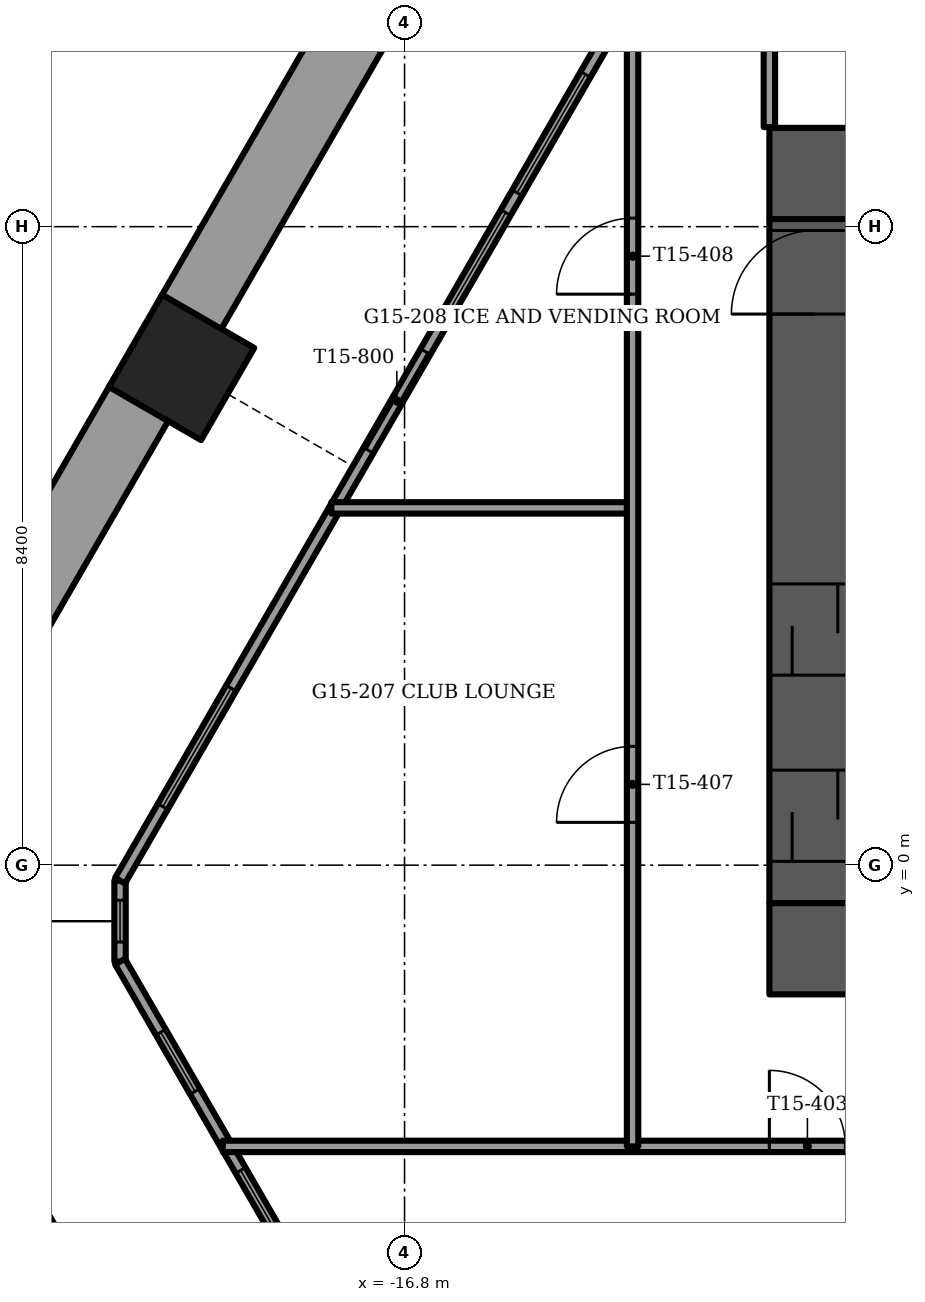
"""IFC4 building model, lengths in metres.
Left out: names, types, materials, properties, quantities, classifications, styles, units other than length and angle.
Written with IfcOpenShell. Run it as: python <this file> out.ifc"""

import sys

from ifc_helpers import new_model, si_unit, direction, frame, frame_2d, origin, origin_2d, place, context, subcontext, project, spatial, rectangle, extrude, element, fill, save


model = new_model("IFC4")
c1 = context("Model", 3, precision=1e-05, world=origin(), true_north=direction((0.0, 1.0)))
c2 = subcontext(c1, "Body", "Model", "MODEL_VIEW")
j1 = project(units=[si_unit("LENGTHUNIT", "METRE"), si_unit("PLANEANGLEUNIT", "RADIAN")], contexts=[c1])
p1 = place(None, origin())
s1 = spatial("IfcSite", under=j1, at=p1, CompositionType="ELEMENT")
p2 = place(p1, origin())
s2 = spatial("IfcBuilding", under=s1, at=p2, CompositionType="ELEMENT")
p3 = place(p2, frame((0.0, 0.0, 61.75)))
s3 = spatial("IfcBuildingStorey", under=s2, at=p3, CompositionType="ELEMENT", Elevation=61.75)
p4 = place(p3, frame((-19.733, 6.549, -1.2), z_axis=(0.0, 0.0, 1.0), x_axis=(0.5, 0.866025403784, 0.0)))
e1 = element("IfcColumn", 1, at=p4, inside=s3, PredefinedType="COLUMN", context=c2, shape_type="SweptSolid", body=[
    extrude(rectangle(XDim=1.4, YDim=1.4, at=origin_2d()), origin(), (0.0, 0.0, 1.0), 3.75),
])
p5 = place(p3, frame((-12.0, -1.1, -0.3), z_axis=(0.0, 0.0, 1.0), x_axis=(1.0, 0.0, 0.0)))
e2 = element("IfcWall", 2, at=p5, inside=s3, PredefinedType="SHEAR", context=c2, shape_type="SweptSolid", body=[
    extrude(rectangle(XDim=24.0, YDim=1.2, at=frame_2d((12.0, 0.0))), origin(), (0.0, 0.0, 1.0), 3.75),
])
p6 = place(p5, frame((11.2, 0.0, 0.0)))
e3 = element("IfcOpeningElement", 3, at=p6, cuts=e2, PredefinedType="OPENING", context=c2, shape_type="SweptSolid", body=[
    extrude(rectangle(XDim=1.6, YDim=2.1, at=frame_2d((0.8, 1.05))), frame((0.0, 0.6, 0.0), z_axis=(0.0, -1.0, 0.0), x_axis=(1.0, 0.0, 0.0)), (0.0, 0.0, 1.0), 1.2),
])
p7 = place(p3, frame((-12.0, 9.1, -0.3), z_axis=(0.0, 0.0, 1.0), x_axis=(1.0, 0.0, 0.0)))
e4 = element("IfcWall", 4, at=p7, inside=s3, PredefinedType="SHEAR", context=c2, shape_type="SweptSolid", body=[
    extrude(rectangle(XDim=24.0, YDim=1.2, at=frame_2d((12.0, 0.0))), origin(), (0.0, 0.0, 1.0), 3.75),
])
p8 = place(p7, frame((11.2, 0.0, 0.0)))
e5 = element("IfcOpeningElement", 5, at=p8, cuts=e4, PredefinedType="OPENING", context=c2, shape_type="SweptSolid", body=[
    extrude(rectangle(XDim=1.6, YDim=2.1, at=frame_2d((0.8, 1.05))), frame((0.0, 0.6, 0.0), z_axis=(0.0, -1.0, 0.0), x_axis=(1.0, 0.0, 0.0)), (0.0, 0.0, 1.0), 1.2),
])
p9 = place(p7, frame((5.25, 0.0, 0.0)))
e6 = element("IfcOpeningElement", 6, at=p9, cuts=e4, PredefinedType="OPENING", context=c2, shape_type="SweptSolid", body=[
    extrude(rectangle(XDim=1.1, YDim=2.1, at=frame_2d((0.55, 1.05))), frame((0.0, 0.6, 0.0), z_axis=(0.0, -1.0, 0.0), x_axis=(1.0, 0.0, 0.0)), (0.0, 0.0, 1.0), 1.2),
])
p10 = place(p7, frame((17.65, 0.0, 0.0)))
e7 = element("IfcOpeningElement", 7, at=p10, cuts=e4, PredefinedType="OPENING", context=c2, shape_type="SweptSolid", body=[
    extrude(rectangle(XDim=1.1, YDim=2.1, at=frame_2d((0.55, 1.05))), frame((0.0, 0.6, 0.0), z_axis=(0.0, -1.0, 0.0), x_axis=(1.0, 0.0, 0.0)), (0.0, 0.0, 1.0), 1.2),
])
p11 = place(p3, frame((-11.4, -0.5, -0.3), z_axis=(0.0, 0.0, 1.0), x_axis=(0.0, 1.0, 0.0)))
e8 = element("IfcWall", 8, at=p11, inside=s3, PredefinedType="SHEAR", context=c2, shape_type="SweptSolid", body=[
    extrude(rectangle(XDim=9.0, YDim=1.2, at=frame_2d((4.5, 0.0))), origin(), (0.0, 0.0, 1.0), 3.75),
])
p12 = place(p11, frame((7.75, 0.0, 0.0)))
e9 = element("IfcOpeningElement", 9, at=p12, cuts=e8, PredefinedType="OPENING", context=c2, shape_type="SweptSolid", body=[
    extrude(rectangle(XDim=1.1, YDim=2.1, at=frame_2d((0.55, 1.05))), frame((0.0, 0.6, 0.0), z_axis=(0.0, -1.0, 0.0), x_axis=(1.0, 0.0, 0.0)), (0.0, 0.0, 1.0), 1.2),
])
p13 = place(p11, frame((0.55, 0.0, 0.0)))
e10 = element("IfcOpeningElement", 10, at=p13, cuts=e8, PredefinedType="OPENING", context=c2, shape_type="SweptSolid", body=[
    extrude(rectangle(XDim=1.2, YDim=2.1, at=frame_2d((0.6, 1.05))), frame((0.0, 0.6, 0.0), z_axis=(0.0, -1.0, 0.0), x_axis=(1.0, 0.0, 0.0)), (0.0, 0.0, 1.0), 1.2),
])
p14 = place(p11, frame((3.0, 0.0, 0.0)))
e11 = element("IfcOpeningElement", 11, at=p14, cuts=e8, PredefinedType="OPENING", context=c2, shape_type="SweptSolid", body=[
    extrude(rectangle(XDim=1.2, YDim=2.1, at=frame_2d((0.6, 1.05))), frame((0.0, 0.6, 0.0), z_axis=(0.0, -1.0, 0.0), x_axis=(1.0, 0.0, 0.0)), (0.0, 0.0, 1.0), 1.2),
])
p15 = place(p3, frame((-16.089, 13.36, 0.0), z_axis=(0.0, 0.0, 1.0), x_axis=(-0.499997206141, -0.866027016814, 0.0)))
e12 = element("IfcWall", 12, at=p15, inside=s3, PredefinedType="PARAPET", context=c2, shape_type="SweptSolid", body=[
    extrude(rectangle(XDim=7.051, YDim=0.9, at=frame_2d((3.525, 0.0))), origin(), (0.0, 0.0, 1.0), 1.1),
])
p16 = place(p3, frame((-20.285, 6.093, 0.0), z_axis=(0.0, 0.0, 1.0), x_axis=(-0.499999136801, -0.866025902152, 0.0)))
e13 = element("IfcWall", 13, at=p16, inside=s3, PredefinedType="PARAPET", context=c2, shape_type="SweptSolid", body=[
    extrude(rectangle(XDim=7.129, YDim=0.9, at=frame_2d((3.564, 0.0))), origin(), (0.0, 0.0, 1.0), 1.1),
])
p17 = place(p3, frame((-23.849, -1.392, 0.0), z_axis=(0.0, 0.0, 1.0), x_axis=(0.500014901547, -0.866016800201, 0.0)))
e14 = element("IfcWall", 14, at=p17, inside=s3, PredefinedType="PARAPET", context=c2, shape_type="SweptSolid", body=[
    extrude(rectangle(XDim=5.853, YDim=0.9, at=frame_2d((2.927, 0.0))), origin(), (0.0, 0.0, 1.0), 1.1),
])
p18 = place(p3, frame((-8.709, 20.292, 0.0), z_axis=(0.0, 0.0, 1.0), x_axis=(-0.500005515081, -0.866022219628, 0.0)))
e15 = element("IfcWall", 15, at=p18, inside=s3, PredefinedType="SOLIDWALL", context=c2, shape_type="SweptSolid", body=[
    extrude(rectangle(XDim=23.667, YDim=0.15, at=frame_2d((11.833, 0.0))), origin(), (0.0, 0.0, 1.0), 3.45),
])
p19 = place(p18, frame((3.825, 0.0, 0.15)))
e16 = element("IfcOpeningElement", 16, at=p19, cuts=e15, PredefinedType="OPENING", context=c2, shape_type="SweptSolid", body=[
    extrude(rectangle(XDim=1.5, YDim=2.85, at=frame_2d((0.75, 1.425))), frame((0.0, 0.075, 0.0), z_axis=(0.0, -1.0, 0.0), x_axis=(1.0, 0.0, 0.0)), (0.0, 0.0, 1.0), 0.15),
])
p20 = place(p18, frame((7.219, 0.0, 0.15)))
e17 = element("IfcOpeningElement", 17, at=p20, cuts=e15, PredefinedType="OPENING", context=c2, shape_type="SweptSolid", body=[
    extrude(rectangle(XDim=0.9, YDim=2.85, at=frame_2d((0.45, 1.425))), frame((0.0, 0.075, 0.0), z_axis=(0.0, -1.0, 0.0), x_axis=(1.0, 0.0, 0.0)), (0.0, 0.0, 1.0), 0.15),
])
p21 = place(p18, frame((8.254, 0.0, 0.15)))
e18 = element("IfcOpeningElement", 18, at=p21, cuts=e15, PredefinedType="OPENING", context=c2, shape_type="SweptSolid", body=[
    extrude(rectangle(XDim=1.5, YDim=2.85, at=frame_2d((0.75, 1.425))), frame((0.0, 0.075, 0.0), z_axis=(0.0, -1.0, 0.0), x_axis=(1.0, 0.0, 0.0)), (0.0, 0.0, 1.0), 0.15),
])
p22 = place(p18, frame((11.419, 0.0, 0.15)))
e19 = element("IfcOpeningElement", 19, at=p22, cuts=e15, PredefinedType="OPENING", context=c2, shape_type="SweptSolid", body=[
    extrude(rectangle(XDim=1.8, YDim=2.85, at=frame_2d((0.9, 1.425))), frame((0.0, 0.075, 0.0), z_axis=(0.0, -1.0, 0.0), x_axis=(1.0, 0.0, 0.0)), (0.0, 0.0, 1.0), 0.15),
])
p23 = place(p18, frame((13.519, 0.0, 0.15)))
e20 = element("IfcOpeningElement", 20, at=p23, cuts=e15, PredefinedType="OPENING", context=c2, shape_type="SweptSolid", body=[
    extrude(rectangle(XDim=1.5, YDim=2.85, at=frame_2d((0.75, 1.425))), frame((0.0, 0.075, 0.0), z_axis=(0.0, -1.0, 0.0), x_axis=(1.0, 0.0, 0.0)), (0.0, 0.0, 1.0), 0.15),
])
p24 = place(p18, frame((15.63, 0.0, 0.0)))
e21 = element("IfcOpeningElement", 21, at=p24, cuts=e15, PredefinedType="OPENING", context=c2, shape_type="SweptSolid", body=[
    extrude(rectangle(XDim=1.5, YDim=2.4, at=frame_2d((0.75, 1.2))), frame((0.0, 0.075, 0.0), z_axis=(0.0, -1.0, 0.0), x_axis=(1.0, 0.0, 0.0)), (0.0, 0.0, 1.0), 0.15),
])
p25 = place(p18, frame((0.41, 0.0, 0.15)))
e22 = element("IfcOpeningElement", 22, at=p25, cuts=e15, PredefinedType="OPENING", context=c2, shape_type="SweptSolid", body=[
    extrude(rectangle(XDim=1.8, YDim=2.73, at=frame_2d((0.9, 1.365))), frame((0.0, 0.075, 0.0), z_axis=(0.0, -1.0, 0.0), x_axis=(1.0, 0.0, 0.0)), (0.0, 0.0, 1.0), 0.15),
])
p26 = place(p18, frame((20.743, 0.0, 0.15)))
e23 = element("IfcOpeningElement", 23, at=p26, cuts=e15, PredefinedType="OPENING", context=c2, shape_type="SweptSolid", body=[
    extrude(rectangle(XDim=1.8, YDim=2.73, at=frame_2d((0.9, 1.365))), frame((0.0, 0.075, 0.0), z_axis=(0.0, -1.0, 0.0), x_axis=(1.0, 0.0, 0.0)), (0.0, 0.0, 1.0), 0.15),
])
p27 = place(p3, frame((-20.543, -1.269, 0.0), z_axis=(0.0, 0.0, 1.0), x_axis=(0.499995095024, -0.866028235655, 0.0)))
e24 = element("IfcWall", 24, at=p27, inside=s3, PredefinedType="SOLIDWALL", context=c2, shape_type="SweptSolid", body=[
    extrude(rectangle(XDim=18.345, YDim=0.15, at=frame_2d((9.172, 0.0))), origin(), (0.0, 0.0, 1.0), 3.45),
])
p28 = place(p27, frame((1.073, 0.0, 0.15)))
e25 = element("IfcOpeningElement", 25, at=p28, cuts=e24, PredefinedType="OPENING", context=c2, shape_type="SweptSolid", body=[
    extrude(rectangle(XDim=0.9, YDim=2.85, at=frame_2d((0.45, 1.425))), frame((0.0, 0.075, 0.0), z_axis=(0.0, -1.0, 0.0), x_axis=(1.0, 0.0, 0.0)), (0.0, 0.0, 1.0), 0.15),
])
p29 = place(p27, frame((3.172, 0.0, 0.15)))
e26 = element("IfcOpeningElement", 26, at=p29, cuts=e24, PredefinedType="OPENING", context=c2, shape_type="SweptSolid", body=[
    extrude(rectangle(XDim=1.5, YDim=2.85, at=frame_2d((0.75, 1.425))), frame((0.0, 0.075, 0.0), z_axis=(0.0, -1.0, 0.0), x_axis=(1.0, 0.0, 0.0)), (0.0, 0.0, 1.0), 0.15),
])
p30 = place(p27, frame((5.272, 0.0, 0.15)))
e27 = element("IfcOpeningElement", 27, at=p30, cuts=e24, PredefinedType="OPENING", context=c2, shape_type="SweptSolid", body=[
    extrude(rectangle(XDim=1.8, YDim=2.85, at=frame_2d((0.9, 1.425))), frame((0.0, 0.075, 0.0), z_axis=(0.0, -1.0, 0.0), x_axis=(1.0, 0.0, 0.0)), (0.0, 0.0, 1.0), 0.15),
])
p31 = place(p27, frame((7.372, 0.0, 0.15)))
e28 = element("IfcOpeningElement", 28, at=p31, cuts=e24, PredefinedType="OPENING", context=c2, shape_type="SweptSolid", body=[
    extrude(rectangle(XDim=1.5, YDim=2.85, at=frame_2d((0.75, 1.425))), frame((0.0, 0.075, 0.0), z_axis=(0.0, -1.0, 0.0), x_axis=(1.0, 0.0, 0.0)), (0.0, 0.0, 1.0), 0.15),
])
p32 = place(p27, frame((9.472, 0.0, 0.15)))
e29 = element("IfcOpeningElement", 29, at=p32, cuts=e24, PredefinedType="OPENING", context=c2, shape_type="SweptSolid", body=[
    extrude(rectangle(XDim=1.8, YDim=2.85, at=frame_2d((0.9, 1.425))), frame((0.0, 0.075, 0.0), z_axis=(0.0, -1.0, 0.0), x_axis=(1.0, 0.0, 0.0)), (0.0, 0.0, 1.0), 0.15),
])
p33 = place(p27, frame((11.573, 0.0, 0.15)))
e30 = element("IfcOpeningElement", 30, at=p33, cuts=e24, PredefinedType="OPENING", context=c2, shape_type="SweptSolid", body=[
    extrude(rectangle(XDim=1.5, YDim=2.85, at=frame_2d((0.75, 1.425))), frame((0.0, 0.075, 0.0), z_axis=(0.0, -1.0, 0.0), x_axis=(1.0, 0.0, 0.0)), (0.0, 0.0, 1.0), 0.15),
])
p34 = place(p27, frame((13.672, 0.0, 0.15)))
e31 = element("IfcOpeningElement", 31, at=p34, cuts=e24, PredefinedType="OPENING", context=c2, shape_type="SweptSolid", body=[
    extrude(rectangle(XDim=1.8, YDim=2.85, at=frame_2d((0.9, 1.425))), frame((0.0, 0.075, 0.0), z_axis=(0.0, -1.0, 0.0), x_axis=(1.0, 0.0, 0.0)), (0.0, 0.0, 1.0), 0.15),
])
p35 = place(p27, frame((15.772, 0.0, 0.15)))
e32 = element("IfcOpeningElement", 32, at=p35, cuts=e24, PredefinedType="OPENING", context=c2, shape_type="SweptSolid", body=[
    extrude(rectangle(XDim=1.5, YDim=2.85, at=frame_2d((0.75, 1.425))), frame((0.0, 0.075, 0.0), z_axis=(0.0, -1.0, 0.0), x_axis=(1.0, 0.0, 0.0)), (0.0, 0.0, 1.0), 0.15),
])
p36 = place(p3, frame((-20.543, -0.204, 0.0), z_axis=(0.0, 0.0, 1.0), x_axis=(0.0, -1.0, 0.0)))
e33 = element("IfcWall", 33, at=p36, inside=s3, PredefinedType="SOLIDWALL", context=c2, shape_type="SweptSolid", body=[
    extrude(rectangle(XDim=1.065, YDim=0.15, at=frame_2d((0.532, 0.0))), origin(), (0.0, 0.0, 1.0), 3.45),
])
p37 = place(p36, frame((0.258, 0.0, 0.15)))
e34 = element("IfcOpeningElement", 34, at=p37, cuts=e33, PredefinedType="OPENING", context=c2, shape_type="SweptSolid", body=[
    extrude(rectangle(XDim=0.55, YDim=2.85, at=frame_2d((0.275, 1.425))), frame((0.0, 0.075, 0.0), z_axis=(0.0, -1.0, 0.0), x_axis=(1.0, 0.0, 0.0)), (0.0, 0.0, 1.0), 0.15),
])
p38 = place(p3, frame((-19.191, -3.7, 0.0), z_axis=(0.0, 0.0, 1.0), x_axis=(1.0, 0.0, 0.0)))
e35 = element("IfcWall", 35, at=p38, inside=s3, PredefinedType="PARTITIONING", context=c2, shape_type="SweptSolid", body=[
    extrude(rectangle(XDim=10.031, YDim=0.15, at=frame_2d((5.016, 0.0))), origin(), (0.0, 0.0, 1.0), 3.45),
])
p39 = place(p38, frame((7.191, 0.0, 0.0)))
e36 = element("IfcOpeningElement", 36, at=p39, cuts=e35, PredefinedType="OPENING", context=c2, shape_type="SweptSolid", body=[
    extrude(rectangle(XDim=1.0, YDim=2.1, at=frame_2d((0.5, 1.05))), frame((0.0, 0.075, 0.0), z_axis=(0.0, -1.0, 0.0), x_axis=(1.0, 0.0, 0.0)), (0.0, 0.0, 1.0), 0.15),
])
p40 = place(p3, frame((-17.763, 4.7, 0.0), z_axis=(0.0, 0.0, 1.0), x_axis=(1.0, 0.0, 0.0)))
e37 = element("IfcWall", 37, at=p40, inside=s3, PredefinedType="PARTITIONING", context=c2, shape_type="SweptSolid", body=[
    extrude(rectangle(XDim=3.963, YDim=0.15, at=frame_2d((1.981, 0.0))), origin(), (0.0, 0.0, 1.0), 3.45),
])
p41 = place(p3, frame((-12.0, 9.71, 0.0), z_axis=(0.0, 0.0, 1.0), x_axis=(0.0, 1.0, 0.0)))
e38 = element("IfcWall", 38, at=p41, inside=s3, PredefinedType="PARTITIONING", context=c2, shape_type="SweptSolid", body=[
    extrude(rectangle(XDim=3.89, YDim=0.15, at=frame_2d((1.945, 0.0))), origin(), (0.0, 0.0, 1.0), 3.45),
])
p42 = place(p3, frame((-13.8, -3.7, 0.0), z_axis=(0.0, 0.0, 1.0), x_axis=(0.0, 1.0, 0.0)))
e39 = element("IfcWall", 39, at=p42, inside=s3, PredefinedType="PARTITIONING", context=c2, shape_type="SweptSolid", body=[
    extrude(rectangle(XDim=15.265, YDim=0.15, at=frame_2d((7.632, 0.0))), origin(), (0.0, 0.0, 1.0), 3.45),
])
p43 = place(p42, frame((4.263, 0.0, 0.0)))
e40 = element("IfcOpeningElement", 40, at=p43, cuts=e39, PredefinedType="OPENING", context=c2, shape_type="SweptSolid", body=[
    extrude(rectangle(XDim=1.0, YDim=2.1, at=frame_2d((0.5, 1.05))), frame((0.0, 0.075, 0.0), z_axis=(0.0, -1.0, 0.0), x_axis=(1.0, 0.0, 0.0)), (0.0, 0.0, 1.0), 0.15),
])
p44 = place(p42, frame((11.212, 0.0, 0.0)))
e41 = element("IfcOpeningElement", 41, at=p44, cuts=e39, PredefinedType="OPENING", context=c2, shape_type="SweptSolid", body=[
    extrude(rectangle(XDim=1.0, YDim=2.1, at=frame_2d((0.5, 1.05))), frame((0.0, 0.075, 0.0), z_axis=(0.0, -1.0, 0.0), x_axis=(1.0, 0.0, 0.0)), (0.0, 0.0, 1.0), 0.15),
])
p45 = place(p22, origin())
e42 = element("IfcWindow", 42, at=p45, inside=s3, PartitioningType="SINGLE_PANEL", PredefinedType="WINDOW", context=c2, shape_type="SweptSolid", body=[
    extrude(rectangle(XDim=1.8, YDim=2.85, at=frame_2d((0.9, 1.425))), frame((0.0, 0.03, 0.0), z_axis=(0.0, -1.0, 0.0), x_axis=(1.0, 0.0, 0.0)), (0.0, 0.0, 1.0), 0.06),
])
fill(e19, e42)
p46 = place(p23, origin())
e43 = element("IfcWindow", 43, at=p46, inside=s3, PartitioningType="SINGLE_PANEL", PredefinedType="WINDOW", context=c2, shape_type="SweptSolid", body=[
    extrude(rectangle(XDim=1.5, YDim=2.85, at=frame_2d((0.75, 1.425))), frame((0.0, 0.03, 0.0), z_axis=(0.0, -1.0, 0.0), x_axis=(1.0, 0.0, 0.0)), (0.0, 0.0, 1.0), 0.06),
])
fill(e20, e43)
p47 = place(p24, origin())
e44 = element("IfcDoor", 44, at=p47, inside=s3, OperationType="SLIDING_TO_RIGHT", PredefinedType="DOOR", context=c2, shape_type="SweptSolid", body=[
    extrude(rectangle(XDim=1.5, YDim=2.4, at=frame_2d((0.75, 1.2))), frame((0.0, 0.025, 0.0), z_axis=(0.0, -1.0, 0.0), x_axis=(1.0, 0.0, 0.0)), (0.0, 0.0, 1.0), 0.05),
])
fill(e21, e44)
p48 = place(p26, origin())
e45 = element("IfcWindow", 45, at=p48, inside=s3, PartitioningType="SINGLE_PANEL", PredefinedType="WINDOW", context=c2, shape_type="SweptSolid", body=[
    extrude(rectangle(XDim=1.8, YDim=2.73, at=frame_2d((0.9, 1.365))), frame((0.0, 0.03, 0.0), z_axis=(0.0, -1.0, 0.0), x_axis=(1.0, 0.0, 0.0)), (0.0, 0.0, 1.0), 0.06),
])
fill(e23, e45)
p49 = place(p28, origin())
e46 = element("IfcWindow", 46, at=p49, inside=s3, PartitioningType="SINGLE_PANEL", PredefinedType="WINDOW", context=c2, shape_type="SweptSolid", body=[
    extrude(rectangle(XDim=0.9, YDim=2.85, at=frame_2d((0.45, 1.425))), frame((0.0, 0.03, 0.0), z_axis=(0.0, -1.0, 0.0), x_axis=(1.0, 0.0, 0.0)), (0.0, 0.0, 1.0), 0.06),
])
fill(e25, e46)
p50 = place(p29, origin())
e47 = element("IfcWindow", 47, at=p50, inside=s3, PartitioningType="SINGLE_PANEL", PredefinedType="WINDOW", context=c2, shape_type="SweptSolid", body=[
    extrude(rectangle(XDim=1.5, YDim=2.85, at=frame_2d((0.75, 1.425))), frame((0.0, 0.03, 0.0), z_axis=(0.0, -1.0, 0.0), x_axis=(1.0, 0.0, 0.0)), (0.0, 0.0, 1.0), 0.06),
])
fill(e26, e47)
p51 = place(p37, origin())
e48 = element("IfcWindow", 48, at=p51, inside=s3, PartitioningType="SINGLE_PANEL", PredefinedType="WINDOW", context=c2, shape_type="SweptSolid", body=[
    extrude(rectangle(XDim=0.55, YDim=2.85, at=frame_2d((0.275, 1.425))), frame((0.0, 0.03, 0.0), z_axis=(0.0, -1.0, 0.0), x_axis=(1.0, 0.0, 0.0)), (0.0, 0.0, 1.0), 0.06),
])
fill(e34, e48)
p52 = place(p12, origin())
e49 = element("IfcDoor", 49, at=p52, inside=s3, OperationType="SINGLE_SWING_LEFT", PredefinedType="DOOR", context=c2, shape_type="SweptSolid", body=[
    extrude(rectangle(XDim=1.1, YDim=2.1, at=frame_2d((0.55, 1.05))), frame((0.0, 0.025, 0.0), z_axis=(0.0, -1.0, 0.0), x_axis=(1.0, 0.0, 0.0)), (0.0, 0.0, 1.0), 0.05),
])
fill(e9, e49)
p53 = place(p13, origin())
e50 = element("IfcDoor", 50, at=p53, inside=s3, OperationType="SLIDING_TO_LEFT", PredefinedType="DOOR", context=c2, shape_type="SweptSolid", body=[
    extrude(rectangle(XDim=1.2, YDim=2.1, at=frame_2d((0.6, 1.05))), frame((0.0, 0.025, 0.0), z_axis=(0.0, -1.0, 0.0), x_axis=(1.0, 0.0, 0.0)), (0.0, 0.0, 1.0), 0.05),
])
fill(e10, e50)
p54 = place(p14, origin())
e51 = element("IfcDoor", 51, at=p54, inside=s3, OperationType="SLIDING_TO_LEFT", PredefinedType="DOOR", context=c2, shape_type="SweptSolid", body=[
    extrude(rectangle(XDim=1.2, YDim=2.1, at=frame_2d((0.6, 1.05))), frame((0.0, 0.025, 0.0), z_axis=(0.0, -1.0, 0.0), x_axis=(1.0, 0.0, 0.0)), (0.0, 0.0, 1.0), 0.05),
])
fill(e11, e51)
p55 = place(p39, origin())
e52 = element("IfcDoor", 52, at=p55, inside=s3, OperationType="SINGLE_SWING_LEFT", PredefinedType="DOOR", context=c2, shape_type="SweptSolid", body=[
    extrude(rectangle(XDim=1.0, YDim=2.1, at=frame_2d((0.5, 1.05))), frame((0.0, 0.025, 0.0), z_axis=(0.0, -1.0, 0.0), x_axis=(1.0, 0.0, 0.0)), (0.0, 0.0, 1.0), 0.05),
])
fill(e36, e52)
p56 = place(p43, origin())
e53 = element("IfcDoor", 53, at=p56, inside=s3, OperationType="SINGLE_SWING_LEFT", PredefinedType="DOOR", context=c2, shape_type="SweptSolid", body=[
    extrude(rectangle(XDim=1.0, YDim=2.1, at=frame_2d((0.5, 1.05))), frame((0.0, 0.025, 0.0), z_axis=(0.0, -1.0, 0.0), x_axis=(1.0, 0.0, 0.0)), (0.0, 0.0, 1.0), 0.05),
])
fill(e40, e53)
p57 = place(p44, origin())
e54 = element("IfcDoor", 54, at=p57, inside=s3, OperationType="SINGLE_SWING_LEFT", PredefinedType="DOOR", context=c2, shape_type="SweptSolid", body=[
    extrude(rectangle(XDim=1.0, YDim=2.1, at=frame_2d((0.5, 1.05))), frame((0.0, 0.025, 0.0), z_axis=(0.0, -1.0, 0.0), x_axis=(1.0, 0.0, 0.0)), (0.0, 0.0, 1.0), 0.05),
])
fill(e41, e54)
save(model, sys.argv[1])
